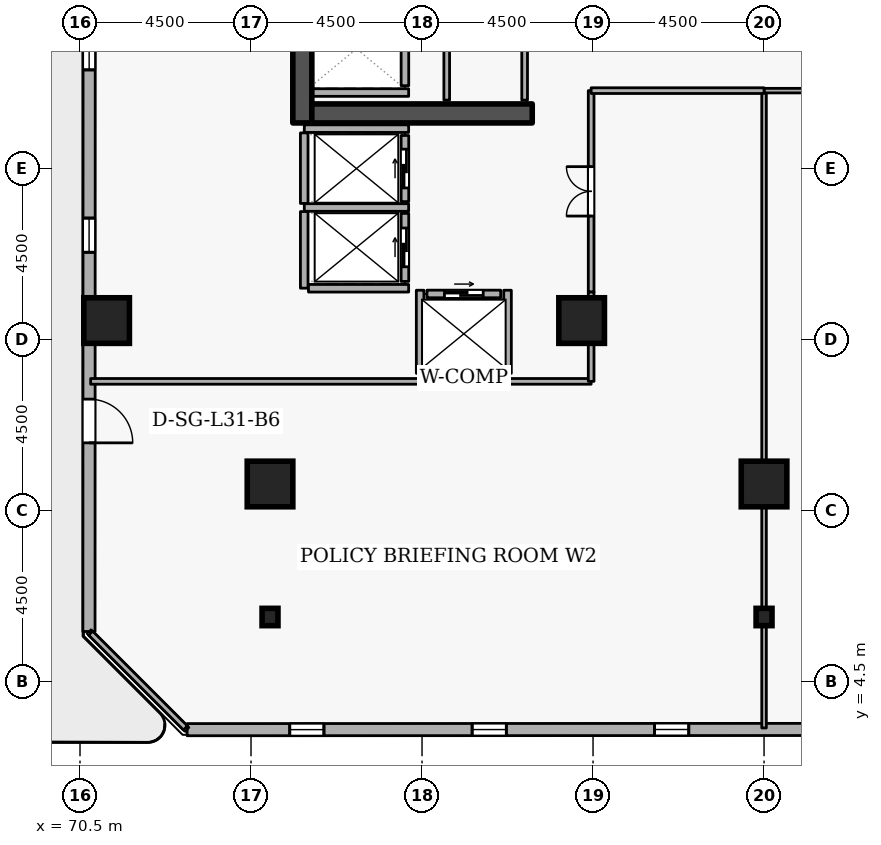
"""IFC4 building model, lengths in metres.
Left out: names, types, materials, properties, quantities, classifications, styles, units other than length and angle.
Written with IfcOpenShell. Run it as: python <this file> out.ifc"""

import sys

from ifc_helpers import new_model, si_unit, direction, frame, frame_2d, origin, origin_2d, place, context, subcontext, project, spatial, rectangle, i_section, extrude, element, fill, save


model = new_model("IFC4")
c1 = context("Model", 3, precision=1e-05, world=origin(), true_north=direction((0.0, 1.0)))
c2 = subcontext(c1, "Body", "Model", "MODEL_VIEW")
j1 = project(units=[si_unit("LENGTHUNIT", "METRE"), si_unit("PLANEANGLEUNIT", "RADIAN")], contexts=[c1])
p1 = place(None, origin())
s1 = spatial("IfcSite", under=j1, at=p1, CompositionType="ELEMENT")
p2 = place(p1, origin())
s2 = spatial("IfcBuilding", under=s1, at=p2, CompositionType="ELEMENT")
p3 = place(p2, frame((0.0, 0.0, 119.7)))
s3 = spatial("IfcBuildingStorey", under=s2, at=p3, CompositionType="ELEMENT", Elevation=119.7)
p4 = place(p3, frame((76.35, 19.2, 0.0), z_axis=(0.0, 0.0, 1.0), x_axis=(0.0, 1.0, 0.0)))
e1 = element("IfcWall", 1, at=p4, inside=s3, PredefinedType="SHEAR", context=c2, shape_type="SweptSolid", body=[
    extrude(rectangle(XDim=15.6, YDim=0.5, at=frame_2d((7.8, 0.0))), origin(), (0.0, 0.0, 1.0), 3.6),
])
p5 = place(p3, frame((76.6, 19.45, 0.0), z_axis=(0.0, 0.0, 1.0), x_axis=(1.0, 0.0, 0.0)))
e2 = element("IfcWall", 2, at=p5, inside=s3, PredefinedType="SHEAR", context=c2, shape_type="SweptSolid", body=[
    extrude(rectangle(XDim=5.8, YDim=0.5, at=frame_2d((2.9, 0.0))), origin(), (0.0, 0.0, 1.0), 3.6),
])
for number, where, z_axis, x_axis in (
    (3, (71.2, 14.0, 0.0), (0.0, 0.0, 1.0), (1.0, 0.0, 0.0)),
    (4, (88.5, 9.7, 0.0), (0.0, 0.0, 1.0), (1.0, 0.0, 0.0)),
    (5, (75.5, 9.7, 0.0), (0.0, 0.0, 1.0), (1.0, 0.0, 0.0)),
    (6, (83.7, 14.0, 0.0), (0.0, 0.0, 1.0), (1.0, 0.0, 0.0)),
):
    element("IfcColumn", number, at=place(p3, frame(where, z_axis=z_axis, x_axis=x_axis)), inside=s3, PredefinedType="COLUMN", context=c2, shape_type="SweptSolid", body=[
        extrude(rectangle(XDim=1.2, YDim=1.2, at=origin_2d()), origin(), (0.0, 0.0, 1.0), 3.6),
    ])
for number, where, z_axis, x_axis in (
    (7, (88.5, 6.2, 0.0), (0.0, 0.0, 1.0), (1.0, 0.0, 0.0)),
    (8, (75.5, 6.2, 0.0), (0.0, 0.0, 1.0), (1.0, 0.0, 0.0)),
):
    element("IfcColumn", number, at=place(p3, frame(where, z_axis=z_axis, x_axis=x_axis)), inside=s3, PredefinedType="COLUMN", context=c2, shape_type="SweptSolid", body=[
        extrude(i_section(OverallWidth=0.418, OverallDepth=0.456, WebThickness=0.042, FlangeThickness=0.067, FilletRadius=0.015, at=origin_2d()), origin(), (0.0, 0.0, 1.0), 3.6),
    ])
p6 = place(p3, frame((73.319, 3.235, 0.0), z_axis=(0.0, 0.0, 1.0), x_axis=(0.999999933399, 0.000364968916, 0.0)))
e9 = element("IfcWall", 9, at=p6, inside=s3, PredefinedType="STANDARD", context=c2, shape_type="SweptSolid", body=[
    extrude(rectangle(XDim=32.778, YDim=0.32, at=frame_2d((16.389, 0.0))), origin(), (0.0, 0.0, 1.0), 2.7),
])
p7 = place(p6, frame((2.7, 0.0, 0.72)))
e10 = element("IfcOpeningElement", 10, at=p7, cuts=e9, PredefinedType="OPENING", context=c2, shape_type="SweptSolid", body=[
    extrude(rectangle(XDim=0.9, YDim=1.75, at=frame_2d((0.45, 0.875))), frame((0.0, 0.17, 0.0), z_axis=(0.0, -1.0, 0.0), x_axis=(1.0, 0.0, 0.0)), (0.0, 0.0, 1.0), 0.34),
])
p8 = place(p6, frame((7.5, 0.0, 0.72)))
e11 = element("IfcOpeningElement", 11, at=p8, cuts=e9, PredefinedType="OPENING", context=c2, shape_type="SweptSolid", body=[
    extrude(rectangle(XDim=0.9, YDim=1.75, at=frame_2d((0.45, 0.875))), frame((0.0, 0.17, 0.0), z_axis=(0.0, -1.0, 0.0), x_axis=(1.0, 0.0, 0.0)), (0.0, 0.0, 1.0), 0.34),
])
p9 = place(p6, frame((12.3, 0.0, 0.72)))
e12 = element("IfcOpeningElement", 12, at=p9, cuts=e9, PredefinedType="OPENING", context=c2, shape_type="SweptSolid", body=[
    extrude(rectangle(XDim=0.9, YDim=1.75, at=frame_2d((0.45, 0.875))), frame((0.0, 0.17, 0.0), z_axis=(0.0, -1.0, 0.0), x_axis=(1.0, 0.0, 0.0)), (0.0, 0.0, 1.0), 0.34),
])
p10 = place(p6, frame((17.1, 0.0, 0.72)))
e13 = element("IfcOpeningElement", 13, at=p10, cuts=e9, PredefinedType="OPENING", context=c2, shape_type="SweptSolid", body=[
    extrude(rectangle(XDim=0.9, YDim=1.75, at=frame_2d((0.45, 0.875))), frame((0.0, 0.17, 0.0), z_axis=(0.0, -1.0, 0.0), x_axis=(1.0, 0.0, 0.0)), (0.0, 0.0, 1.0), 0.34),
])
p11 = place(p6, frame((21.9, 0.0, 0.72)))
e14 = element("IfcOpeningElement", 14, at=p11, cuts=e9, PredefinedType="OPENING", context=c2, shape_type="SweptSolid", body=[
    extrude(rectangle(XDim=0.9, YDim=1.75, at=frame_2d((0.45, 0.875))), frame((0.0, 0.17, 0.0), z_axis=(0.0, -1.0, 0.0), x_axis=(1.0, 0.0, 0.0)), (0.0, 0.0, 1.0), 0.34),
])
p12 = place(p6, frame((26.7, 0.0, 0.72)))
e15 = element("IfcOpeningElement", 15, at=p12, cuts=e9, PredefinedType="OPENING", context=c2, shape_type="SweptSolid", body=[
    extrude(rectangle(XDim=0.9, YDim=1.75, at=frame_2d((0.45, 0.875))), frame((0.0, 0.17, 0.0), z_axis=(0.0, -1.0, 0.0), x_axis=(1.0, 0.0, 0.0)), (0.0, 0.0, 1.0), 0.34),
])
p13 = place(p3, frame((70.747, 38.596, 0.0), z_axis=(0.0, 0.0, 1.0), x_axis=(-0.000364968916, -0.999999933399, 0.0)))
e16 = element("IfcWall", 16, at=p13, inside=s3, PredefinedType="STANDARD", context=c2, shape_type="SweptSolid", body=[
    extrude(rectangle(XDim=32.778, YDim=0.32, at=frame_2d((16.389, 0.0))), origin(), (0.0, 0.0, 1.0), 2.7),
])
p14 = place(p13, frame((26.664, 0.0, 0.0)))
e17 = element("IfcOpeningElement", 17, at=p14, cuts=e16, PredefinedType="OPENING", context=c2, shape_type="SweptSolid", body=[
    extrude(rectangle(XDim=1.15, YDim=2.1, at=frame_2d((0.575, 1.05))), frame((0.0, 0.17, 0.0), z_axis=(0.0, -1.0, 0.0), x_axis=(1.0, 0.0, 0.0)), (0.0, 0.0, 1.0), 0.34),
])
p15 = place(p13, frame((2.7, 0.0, 0.72)))
e18 = element("IfcOpeningElement", 18, at=p15, cuts=e16, PredefinedType="OPENING", context=c2, shape_type="SweptSolid", body=[
    extrude(rectangle(XDim=0.9, YDim=1.75, at=frame_2d((0.45, 0.875))), frame((0.0, 0.17, 0.0), z_axis=(0.0, -1.0, 0.0), x_axis=(1.0, 0.0, 0.0)), (0.0, 0.0, 1.0), 0.34),
])
p16 = place(p13, frame((7.5, 0.0, 0.72)))
e19 = element("IfcOpeningElement", 19, at=p16, cuts=e16, PredefinedType="OPENING", context=c2, shape_type="SweptSolid", body=[
    extrude(rectangle(XDim=0.9, YDim=1.75, at=frame_2d((0.45, 0.875))), frame((0.0, 0.17, 0.0), z_axis=(0.0, -1.0, 0.0), x_axis=(1.0, 0.0, 0.0)), (0.0, 0.0, 1.0), 0.34),
])
p17 = place(p13, frame((17.1, 0.0, 0.72)))
e20 = element("IfcOpeningElement", 20, at=p17, cuts=e16, PredefinedType="OPENING", context=c2, shape_type="SweptSolid", body=[
    extrude(rectangle(XDim=0.9, YDim=1.75, at=frame_2d((0.45, 0.875))), frame((0.0, 0.17, 0.0), z_axis=(0.0, -1.0, 0.0), x_axis=(1.0, 0.0, 0.0)), (0.0, 0.0, 1.0), 0.34),
])
p18 = place(p13, frame((21.9, 0.0, 0.72)))
e21 = element("IfcOpeningElement", 21, at=p18, cuts=e16, PredefinedType="OPENING", context=c2, shape_type="SweptSolid", body=[
    extrude(rectangle(XDim=0.9, YDim=1.75, at=frame_2d((0.45, 0.875))), frame((0.0, 0.17, 0.0), z_axis=(0.0, -1.0, 0.0), x_axis=(1.0, 0.0, 0.0)), (0.0, 0.0, 1.0), 0.34),
])
p19 = place(p3, frame((79.05, 20.18, 0.0), z_axis=(0.0, 0.0, 1.0), x_axis=(0.0, 1.0, 0.0)))
e22 = element("IfcWall", 22, at=p19, inside=s3, PredefinedType="STANDARD", context=c2, shape_type="SweptSolid", body=[
    extrude(rectangle(XDim=1.94, YDim=0.2, at=frame_2d((0.97, 0.0))), origin(), (0.0, 0.0, 1.0), 3.32),
])
p20 = place(p3, frame((79.05, 17.13, 0.0), z_axis=(0.0, 0.0, 1.0), x_axis=(0.0, 1.0, 0.0)))
e23 = element("IfcWall", 23, at=p20, inside=s3, PredefinedType="STANDARD", context=c2, shape_type="SweptSolid", body=[
    extrude(rectangle(XDim=1.74, YDim=0.2, at=frame_2d((0.87, 0.0))), origin(), (0.0, 0.0, 1.0), 3.32),
])
p21 = place(p20, frame((0.36, 0.0, 0.0)))
e24 = element("IfcOpeningElement", 24, at=p21, cuts=e23, PredefinedType="OPENING", context=c2, shape_type="SweptSolid", body=[
    extrude(rectangle(XDim=1.02, YDim=2.06, at=frame_2d((0.51, 1.03))), frame((0.0, 0.11, 0.0), z_axis=(0.0, -1.0, 0.0), x_axis=(1.0, 0.0, 0.0)), (0.0, 0.0, 1.0), 0.22),
])
p22 = place(p3, frame((79.05, 15.03, 0.0), z_axis=(0.0, 0.0, 1.0), x_axis=(0.0, 1.0, 0.0)))
e25 = element("IfcWall", 25, at=p22, inside=s3, PredefinedType="STANDARD", context=c2, shape_type="SweptSolid", body=[
    extrude(rectangle(XDim=1.79, YDim=0.2, at=frame_2d((0.895, 0.0))), origin(), (0.0, 0.0, 1.0), 3.32),
])
p23 = place(p22, frame((0.385, 0.0, 0.0)))
e26 = element("IfcOpeningElement", 26, at=p23, cuts=e25, PredefinedType="OPENING", context=c2, shape_type="SweptSolid", body=[
    extrude(rectangle(XDim=1.02, YDim=2.06, at=frame_2d((0.51, 1.03))), frame((0.0, 0.11, 0.0), z_axis=(0.0, -1.0, 0.0), x_axis=(1.0, 0.0, 0.0)), (0.0, 0.0, 1.0), 0.22),
])
p24 = place(p3, frame((79.63, 14.7, 0.0), z_axis=(0.0, 0.0, 1.0), x_axis=(1.0, 0.0, 0.0)))
e27 = element("IfcWall", 27, at=p24, inside=s3, PredefinedType="STANDARD", context=c2, shape_type="SweptSolid", body=[
    extrude(rectangle(XDim=1.94, YDim=0.2, at=frame_2d((0.97, 0.0))), origin(), (0.0, 0.0, 1.0), 3.32),
])
p25 = place(p24, frame((0.46, 0.0, 0.0)))
e28 = element("IfcOpeningElement", 28, at=p25, cuts=e27, PredefinedType="OPENING", context=c2, shape_type="SweptSolid", body=[
    extrude(rectangle(XDim=1.02, YDim=2.06, at=frame_2d((0.51, 1.03))), frame((0.0, 0.11, 0.0), z_axis=(0.0, -1.0, 0.0), x_axis=(1.0, 0.0, 0.0)), (0.0, 0.0, 1.0), 0.22),
])
p26 = place(p3, frame((76.612, 20.0, 0.0), z_axis=(0.0, 0.0, 1.0), x_axis=(1.0, 0.0, 0.0)))
e29 = element("IfcWall", 29, at=p26, inside=s3, PredefinedType="STANDARD", context=c2, shape_type="SweptSolid", body=[
    extrude(rectangle(XDim=2.536, YDim=0.2, at=frame_2d((1.268, 0.0))), origin(), (0.0, 0.0, 1.0), 3.32),
])
p27 = place(p3, frame((76.402, 19.05, 0.0), z_axis=(0.0, 0.0, 1.0), x_axis=(1.0, 0.0, 0.0)))
e30 = element("IfcWall", 30, at=p27, inside=s3, PredefinedType="STANDARD", context=c2, shape_type="SweptSolid", body=[
    extrude(rectangle(XDim=2.746, YDim=0.2, at=frame_2d((1.373, 0.0))), origin(), (0.0, 0.0, 1.0), 2.525),
])
p28 = place(p3, frame((76.402, 16.975, 0.0), z_axis=(0.0, 0.0, 1.0), x_axis=(1.0, 0.0, 0.0)))
e31 = element("IfcWall", 31, at=p28, inside=s3, PredefinedType="STANDARD", context=c2, shape_type="SweptSolid", body=[
    extrude(rectangle(XDim=2.746, YDim=0.2, at=frame_2d((1.373, 0.0))), origin(), (0.0, 0.0, 1.0), 3.32),
])
p29 = place(p3, frame((76.4, 14.852, 0.0), z_axis=(0.0, 0.0, 1.0), x_axis=(0.0, 1.0, 0.0)))
e32 = element("IfcWall", 32, at=p29, inside=s3, PredefinedType="STANDARD", context=c2, shape_type="SweptSolid", body=[
    extrude(rectangle(XDim=2.016, YDim=0.2, at=frame_2d((1.008, 0.0))), origin(), (0.0, 0.0, 1.0), 3.32),
])
p30 = place(p3, frame((76.4, 17.082, 0.0), z_axis=(0.0, 0.0, 1.0), x_axis=(0.0, 1.0, 0.0)))
e33 = element("IfcWall", 33, at=p30, inside=s3, PredefinedType="STANDARD", context=c2, shape_type="SweptSolid", body=[
    extrude(rectangle(XDim=1.856, YDim=0.2, at=frame_2d((0.928, 0.0))), origin(), (0.0, 0.0, 1.0), 3.32),
])
p31 = place(p3, frame((76.512, 14.85, 0.0), z_axis=(0.0, 0.0, 1.0), x_axis=(1.0, 0.0, 0.0)))
e34 = element("IfcWall", 34, at=p31, inside=s3, PredefinedType="STANDARD", context=c2, shape_type="SweptSolid", body=[
    extrude(rectangle(XDim=2.636, YDim=0.2, at=frame_2d((1.318, 0.0))), origin(), (0.0, 0.0, 1.0), 3.32),
])
p32 = place(p3, frame((79.452, 12.5, 0.0), z_axis=(0.0, 0.0, 1.0), x_axis=(1.0, 0.0, 0.0)))
e35 = element("IfcWall", 35, at=p32, inside=s3, PredefinedType="STANDARD", context=c2, shape_type="SweptSolid", body=[
    extrude(rectangle(XDim=2.296, YDim=0.2, at=frame_2d((1.148, 0.0))), origin(), (0.0, 0.0, 1.0), 3.32),
])
for number, where, z_axis, x_axis in (
    (36, (81.75, 12.612, 0.0), (0.0, 0.0, 1.0), (0.0, 1.0, 0.0)),
    (37, (79.45, 12.612, 0.0), (0.0, 0.0, 1.0), (0.0, 1.0, 0.0)),
):
    element("IfcWall", number, at=place(p3, frame(where, z_axis=z_axis, x_axis=x_axis)), inside=s3, PredefinedType="STANDARD", context=c2, shape_type="SweptSolid", body=[
        extrude(rectangle(XDim=2.186, YDim=0.2, at=frame_2d((1.093, 0.0))), origin(), (0.0, 0.0, 1.0), 3.32),
    ])
p33 = place(p3, frame((80.15, 19.8, 0.0), z_axis=(0.0, 0.0, 1.0), x_axis=(0.0, 1.0, 0.0)))
e38 = element("IfcWall", 38, at=p33, inside=s3, PredefinedType="PARTITIONING", context=c2, shape_type="SweptSolid", body=[
    extrude(rectangle(XDim=4.25, YDim=0.15, at=frame_2d((2.125, 0.0))), origin(), (0.0, 0.0, 1.0), 3.32),
])
p34 = place(p3, frame((82.2, 24.05, 0.0), z_axis=(0.0, 0.0, 1.0), x_axis=(0.0, -1.0, 0.0)))
e39 = element("IfcWall", 39, at=p34, inside=s3, PredefinedType="PARTITIONING", context=c2, shape_type="SweptSolid", body=[
    extrude(rectangle(XDim=4.25, YDim=0.15, at=frame_2d((2.125, 0.0))), origin(), (0.0, 0.0, 1.0), 3.32),
])
p35 = place(p34, frame((1.665, 0.0, 0.0)))
e40 = element("IfcOpeningElement", 40, at=p35, cuts=e39, PredefinedType="OPENING", context=c2, shape_type="SweptSolid", body=[
    extrude(rectangle(XDim=0.92, YDim=2.08, at=frame_2d((0.46, 1.04))), frame((0.0, 0.085, 0.0), z_axis=(0.0, -1.0, 0.0), x_axis=(1.0, 0.0, 0.0)), (0.0, 0.0, 1.0), 0.17),
])
p36 = place(p3, frame((88.5, 3.28, 0.0), z_axis=(0.0, 0.0, 1.0), x_axis=(0.0, 1.0, 0.0)))
e41 = element("IfcWall", 41, at=p36, inside=s3, PredefinedType="PARTITIONING", context=c2, shape_type="SweptSolid", body=[
    extrude(rectangle(XDim=16.77, YDim=0.12, at=frame_2d((8.385, 0.0))), origin(), (0.0, 0.0, 1.0), 2.912),
])
p37 = place(p3, frame((88.5, 20.05, 0.0), z_axis=(0.0, 0.0, 1.0), x_axis=(1.0, 0.0, 0.0)))
e42 = element("IfcWall", 42, at=p37, inside=s3, PredefinedType="PARTITIONING", context=c2, shape_type="SweptSolid", body=[
    extrude(rectangle(XDim=4.55, YDim=0.12, at=frame_2d((2.275, 0.0))), origin(), (0.0, 0.0, 1.0), 3.32),
])
p38 = place(p3, frame((83.95, 14.75, 0.0), z_axis=(0.0, 0.0, 1.0), x_axis=(0.0, 1.0, 0.0)))
e43 = element("IfcWall", 43, at=p38, inside=s3, PredefinedType="PARTITIONING", context=c2, shape_type="SweptSolid", body=[
    extrude(rectangle(XDim=5.3, YDim=0.15, at=frame_2d((2.65, 0.0))), origin(), (0.0, 0.0, 1.0), 3.32),
])
p39 = place(p38, frame((2.0, 0.0, 0.0)))
e44 = element("IfcOpeningElement", 44, at=p39, cuts=e43, PredefinedType="OPENING", context=c2, shape_type="SweptSolid", body=[
    extrude(rectangle(XDim=1.3, YDim=2.12, at=frame_2d((0.65, 1.06))), frame((0.0, 0.085, 0.0), z_axis=(0.0, -1.0, 0.0), x_axis=(1.0, 0.0, 0.0)), (0.0, 0.0, 1.0), 0.17),
])
p40 = place(p3, frame((83.95, 20.05, 0.0), z_axis=(0.0, 0.0, 1.0), x_axis=(1.0, 0.0, 0.0)))
e45 = element("IfcWall", 45, at=p40, inside=s3, PredefinedType="PARTITIONING", context=c2, shape_type="SweptSolid", body=[
    extrude(rectangle(XDim=4.55, YDim=0.15, at=frame_2d((2.275, 0.0))), origin(), (0.0, 0.0, 1.0), 3.32),
])
p41 = place(p3, frame((73.275, 3.28, 0.0), z_axis=(0.0, 0.0, 1.0), x_axis=(-0.707106781187, 0.707106781187, 0.0)))
e46 = element("IfcWall", 46, at=p41, inside=s3, PredefinedType="PARTITIONING", context=c2, shape_type="SweptSolid", body=[
    extrude(rectangle(XDim=3.528, YDim=0.15, at=frame_2d((1.764, 0.0))), origin(), (0.0, 0.0, 1.0), 3.32),
])
p42 = place(p3, frame((70.78, 12.4, 0.0), z_axis=(0.0, 0.0, 1.0), x_axis=(1.0, 0.0, 0.0)))
e47 = element("IfcWall", 47, at=p42, inside=s3, PredefinedType="PARTITIONING", context=c2, shape_type="SweptSolid", body=[
    extrude(rectangle(XDim=8.672, YDim=0.15, at=frame_2d((4.336, 0.0))), origin(), (0.0, 0.0, 1.0), 3.32),
])
p43 = place(p3, frame((81.748, 12.4, 0.0), z_axis=(0.0, 0.0, 1.0), x_axis=(1.0, 0.0, 0.0)))
e48 = element("IfcWall", 48, at=p43, inside=s3, PredefinedType="PARTITIONING", context=c2, shape_type="SweptSolid", body=[
    extrude(rectangle(XDim=2.202, YDim=0.15, at=frame_2d((1.101, 0.0))), origin(), (0.0, 0.0, 1.0), 3.32),
])
p44 = place(p3, frame((83.95, 12.4, 0.0), z_axis=(0.0, 0.0, 1.0), x_axis=(0.0, 1.0, 0.0)))
e49 = element("IfcWall", 49, at=p44, inside=s3, PredefinedType="PARTITIONING", context=c2, shape_type="SweptSolid", body=[
    extrude(rectangle(XDim=2.35, YDim=0.15, at=frame_2d((1.175, 0.0))), origin(), (0.0, 0.0, 1.0), 3.32),
])
p45 = place(p7, origin())
e50 = element("IfcWindow", 50, at=p45, inside=s3, PartitioningType="SINGLE_PANEL", PredefinedType="WINDOW", context=c2, shape_type="SweptSolid", body=[
    extrude(rectangle(XDim=0.9, YDim=1.75, at=frame_2d((0.45, 0.875))), frame((0.0, 0.03, 0.0), z_axis=(0.0, -1.0, 0.0), x_axis=(1.0, 0.0, 0.0)), (0.0, 0.0, 1.0), 0.06),
])
fill(e10, e50)
p46 = place(p8, origin())
e51 = element("IfcWindow", 51, at=p46, inside=s3, PartitioningType="SINGLE_PANEL", PredefinedType="WINDOW", context=c2, shape_type="SweptSolid", body=[
    extrude(rectangle(XDim=0.9, YDim=1.75, at=frame_2d((0.45, 0.875))), frame((0.0, 0.03, 0.0), z_axis=(0.0, -1.0, 0.0), x_axis=(1.0, 0.0, 0.0)), (0.0, 0.0, 1.0), 0.06),
])
fill(e11, e51)
p47 = place(p9, origin())
e52 = element("IfcWindow", 52, at=p47, inside=s3, PartitioningType="SINGLE_PANEL", PredefinedType="WINDOW", context=c2, shape_type="SweptSolid", body=[
    extrude(rectangle(XDim=0.9, YDim=1.75, at=frame_2d((0.45, 0.875))), frame((0.0, 0.03, 0.0), z_axis=(0.0, -1.0, 0.0), x_axis=(1.0, 0.0, 0.0)), (0.0, 0.0, 1.0), 0.06),
])
fill(e12, e52)
p48 = place(p14, origin())
e53 = element("IfcDoor", 53, at=p48, inside=s3, OperationType="SINGLE_SWING_RIGHT", PredefinedType="DOOR", context=c2, shape_type="SweptSolid", body=[
    extrude(rectangle(XDim=1.15, YDim=2.1, at=frame_2d((0.575, 1.05))), frame((0.0, 0.025, 0.0), z_axis=(0.0, -1.0, 0.0), x_axis=(1.0, 0.0, 0.0)), (0.0, 0.0, 1.0), 0.05),
])
fill(e17, e53)
p49 = place(p17, origin())
e54 = element("IfcWindow", 54, at=p49, inside=s3, PartitioningType="SINGLE_PANEL", PredefinedType="WINDOW", context=c2, shape_type="SweptSolid", body=[
    extrude(rectangle(XDim=0.9, YDim=1.75, at=frame_2d((0.45, 0.875))), frame((0.0, 0.03, 0.0), z_axis=(0.0, -1.0, 0.0), x_axis=(1.0, 0.0, 0.0)), (0.0, 0.0, 1.0), 0.06),
])
fill(e20, e54)
p50 = place(p18, origin())
e55 = element("IfcWindow", 55, at=p50, inside=s3, PartitioningType="SINGLE_PANEL", PredefinedType="WINDOW", context=c2, shape_type="SweptSolid", body=[
    extrude(rectangle(XDim=0.9, YDim=1.75, at=frame_2d((0.45, 0.875))), frame((0.0, 0.03, 0.0), z_axis=(0.0, -1.0, 0.0), x_axis=(1.0, 0.0, 0.0)), (0.0, 0.0, 1.0), 0.06),
])
fill(e21, e55)
p51 = place(p21, origin())
e56 = element("IfcDoor", 56, at=p51, inside=s3, OperationType="SLIDING_TO_LEFT", PredefinedType="DOOR", context=c2, shape_type="SweptSolid", body=[
    extrude(rectangle(XDim=1.02, YDim=2.06, at=frame_2d((0.51, 1.03))), frame((0.0, 0.025, 0.0), z_axis=(0.0, -1.0, 0.0), x_axis=(1.0, 0.0, 0.0)), (0.0, 0.0, 1.0), 0.05),
])
fill(e24, e56)
p52 = place(p23, origin())
e57 = element("IfcDoor", 57, at=p52, inside=s3, OperationType="SLIDING_TO_LEFT", PredefinedType="DOOR", context=c2, shape_type="SweptSolid", body=[
    extrude(rectangle(XDim=1.02, YDim=2.06, at=frame_2d((0.51, 1.03))), frame((0.0, 0.025, 0.0), z_axis=(0.0, -1.0, 0.0), x_axis=(1.0, 0.0, 0.0)), (0.0, 0.0, 1.0), 0.05),
])
fill(e26, e57)
p53 = place(p25, origin())
e58 = element("IfcDoor", 58, at=p53, inside=s3, OperationType="SLIDING_TO_LEFT", PredefinedType="DOOR", context=c2, shape_type="SweptSolid", body=[
    extrude(rectangle(XDim=1.02, YDim=2.06, at=frame_2d((0.51, 1.03))), frame((0.0, 0.025, 0.0), z_axis=(0.0, -1.0, 0.0), x_axis=(1.0, 0.0, 0.0)), (0.0, 0.0, 1.0), 0.05),
])
fill(e28, e58)
p54 = place(p39, origin())
e59 = element("IfcDoor", 59, at=p54, inside=s3, OperationType="DOUBLE_DOOR_SINGLE_SWING", PredefinedType="DOOR", context=c2, shape_type="SweptSolid", body=[
    extrude(rectangle(XDim=1.3, YDim=2.12, at=frame_2d((0.65, 1.06))), frame((0.0, 0.025, 0.0), z_axis=(0.0, -1.0, 0.0), x_axis=(1.0, 0.0, 0.0)), (0.0, 0.0, 1.0), 0.05),
])
fill(e44, e59)
save(model, sys.argv[1])
